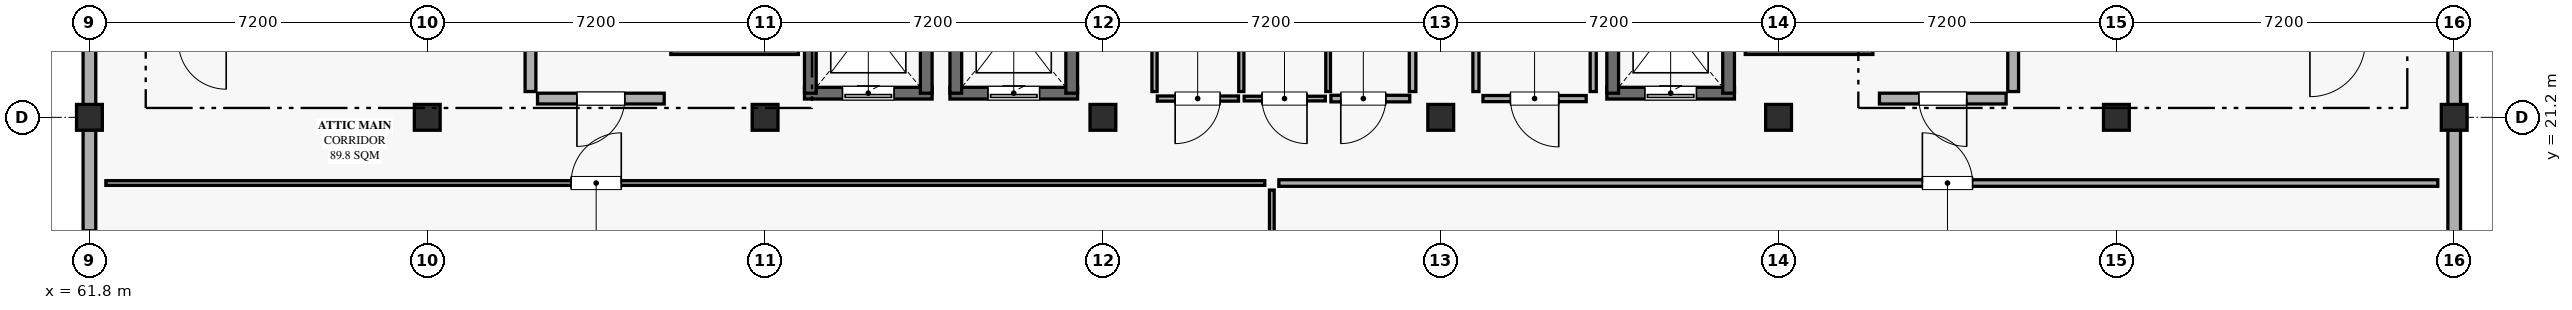
"""IFC4 building model, lengths in metres.
Left out: names, types, materials, properties, quantities, classifications, styles, units other than length and angle.
Written with IfcOpenShell. Run it as: python <this file> out.ifc"""

import sys

from ifc_helpers import new_model, si_unit, direction, frame, frame_2d, origin, origin_2d, place, context, subcontext, project, spatial, rectangle, extrude, element, fill, save


model = new_model("IFC4")
c1 = context("Model", 3, precision=1e-05, world=origin(), true_north=direction((0.0, 1.0)))
c2 = subcontext(c1, "Body", "Model", "MODEL_VIEW")
j1 = project(units=[si_unit("LENGTHUNIT", "METRE"), si_unit("PLANEANGLEUNIT", "RADIAN")], contexts=[c1])
p1 = place(None, origin())
s1 = spatial("IfcSite", under=j1, at=p1, CompositionType="ELEMENT")
p2 = place(p1, origin())
s2 = spatial("IfcBuilding", under=s1, at=p2, CompositionType="ELEMENT")
p3 = place(p2, frame((0.0, 0.0, 41.94)))
s3 = spatial("IfcBuildingStorey", under=s2, at=p3, CompositionType="ELEMENT", Elevation=41.94)
for number, where, z_axis, x_axis in (
    (1, (61.8, 21.2, 0.0), (0.0, 0.0, 1.0), (1.0, 0.0, 0.0)),
    (2, (69.0, 21.2, 0.0), (0.0, 0.0, 1.0), (1.0, 0.0, 0.0)),
    (3, (76.2, 21.2, 0.0), (0.0, 0.0, 1.0), (1.0, 0.0, 0.0)),
    (4, (83.4, 21.2, 0.0), (0.0, 0.0, 1.0), (1.0, 0.0, 0.0)),
    (5, (90.6, 21.2, 0.0), (0.0, 0.0, 1.0), (1.0, 0.0, 0.0)),
    (6, (97.8, 21.2, 0.0), (0.0, 0.0, 1.0), (1.0, 0.0, 0.0)),
    (7, (105.0, 21.2, 0.0), (0.0, 0.0, 1.0), (1.0, 0.0, 0.0)),
    (8, (112.2, 21.2, 0.0), (0.0, 0.0, 1.0), (1.0, 0.0, 0.0)),
):
    element("IfcColumn", number, at=place(p3, frame(where, z_axis=z_axis, x_axis=x_axis)), inside=s3, PredefinedType="COLUMN", context=c2, shape_type="SweptSolid", body=[
        extrude(rectangle(XDim=0.55, YDim=0.55, at=origin_2d()), origin(), (0.0, 0.0, 1.0), 4.32),
    ])
p4 = place(p3, frame((61.8, 14.26, 0.0), z_axis=(0.0, 0.0, 1.0), x_axis=(0.0, 1.0, 0.0)))
e9 = element("IfcWall", 9, at=p4, inside=s3, PredefinedType="SOLIDWALL", context=c2, shape_type="SweptSolid", body=[
    extrude(rectangle(XDim=6.68, YDim=0.27, at=frame_2d((3.34, 0.0))), origin(), (0.0, 0.0, 1.0), 2.82),
])
p5 = place(p4, frame((2.14, 0.0, 0.85)))
e10 = element("IfcOpeningElement", 10, at=p5, cuts=e9, PredefinedType="OPENING", context=c2, shape_type="SweptSolid", body=[
    extrude(rectangle(XDim=2.4, YDim=1.8, at=frame_2d((1.2, 0.9))), frame((0.0, 0.145, 0.0), z_axis=(0.0, -1.0, 0.0), x_axis=(1.0, 0.0, 0.0)), (0.0, 0.0, 1.0), 0.29),
])
p6 = place(p3, frame((112.2, 20.94, 0.0), z_axis=(0.0, 0.0, 1.0), x_axis=(0.0, -1.0, 0.0)))
e11 = element("IfcWall", 11, at=p6, inside=s3, PredefinedType="SOLIDWALL", context=c2, shape_type="SweptSolid", body=[
    extrude(rectangle(XDim=6.68, YDim=0.27, at=frame_2d((3.34, 0.0))), origin(), (0.0, 0.0, 1.0), 2.82),
])
p7 = place(p6, frame((2.59, 0.0, 0.85)))
e12 = element("IfcOpeningElement", 12, at=p7, cuts=e11, PredefinedType="OPENING", context=c2, shape_type="SweptSolid", body=[
    extrude(rectangle(XDim=1.5, YDim=1.8, at=frame_2d((0.75, 0.9))), frame((0.0, 0.145, 0.0), z_axis=(0.0, -1.0, 0.0), x_axis=(1.0, 0.0, 0.0)), (0.0, 0.0, 1.0), 0.29),
])
p8 = place(p3, frame((61.8, 21.46, 0.0), z_axis=(0.0, 0.0, 1.0), x_axis=(0.0, 1.0, 0.0)))
e13 = element("IfcWall", 13, at=p8, inside=s3, PredefinedType="SOLIDWALL", context=c2, shape_type="SweptSolid", body=[
    extrude(rectangle(XDim=6.68, YDim=0.27, at=frame_2d((3.34, 0.0))), origin(), (0.0, 0.0, 1.0), 2.82),
])
p9 = place(p8, frame((2.14, 0.0, 0.85)))
e14 = element("IfcOpeningElement", 14, at=p9, cuts=e13, PredefinedType="OPENING", context=c2, shape_type="SweptSolid", body=[
    extrude(rectangle(XDim=2.4, YDim=1.8, at=frame_2d((1.2, 0.9))), frame((0.0, 0.145, 0.0), z_axis=(0.0, -1.0, 0.0), x_axis=(1.0, 0.0, 0.0)), (0.0, 0.0, 1.0), 0.29),
])
p10 = place(p3, frame((112.2, 28.14, 0.0), z_axis=(0.0, 0.0, 1.0), x_axis=(0.0, -1.0, 0.0)))
e15 = element("IfcWall", 15, at=p10, inside=s3, PredefinedType="SOLIDWALL", context=c2, shape_type="SweptSolid", body=[
    extrude(rectangle(XDim=6.68, YDim=0.27, at=frame_2d((3.34, 0.0))), origin(), (0.0, 0.0, 1.0), 2.82),
])
p11 = place(p10, frame((2.59, 0.0, 0.85)))
e16 = element("IfcOpeningElement", 16, at=p11, cuts=e15, PredefinedType="OPENING", context=c2, shape_type="SweptSolid", body=[
    extrude(rectangle(XDim=1.5, YDim=1.8, at=frame_2d((0.75, 0.9))), frame((0.0, 0.145, 0.0), z_axis=(0.0, -1.0, 0.0), x_axis=(1.0, 0.0, 0.0)), (0.0, 0.0, 1.0), 0.29),
])
for number, where, z_axis, x_axis in (
    (17, (76.91, 22.665, 0.0), (0.0, 0.0, 1.0), (-1.0, 0.0, 0.0)),
    (18, (99.81, 22.665, 0.0), (0.0, 0.0, 1.0), (-1.0, 0.0, 0.0)),
):
    element("IfcWall", number, at=place(p3, frame(where, z_axis=z_axis, x_axis=x_axis)), inside=s3, PredefinedType="SHEAR", context=c2, shape_type="SweptSolid", body=[
        extrude(rectangle(XDim=2.72, YDim=0.25, at=frame_2d((1.36, 0.0))), origin(), (0.0, 0.0, 1.0), 4.07),
    ])
p12 = place(p3, frame((79.76, 21.715, 0.0), z_axis=(0.0, 0.0, 1.0), x_axis=(-1.0, 0.0, 0.0)))
e19 = element("IfcWall", 19, at=p12, inside=s3, PredefinedType="SHEAR", context=c2, shape_type="SweptSolid", body=[
    extrude(rectangle(XDim=2.72, YDim=0.25, at=frame_2d((1.36, 0.0))), origin(), (0.0, 0.0, 1.0), 4.07),
])
p13 = place(p12, frame((0.81, 0.0, 0.0)))
e20 = element("IfcOpeningElement", 20, at=p13, cuts=e19, PredefinedType="OPENING", context=c2, shape_type="SweptSolid", body=[
    extrude(rectangle(XDim=1.1, YDim=2.2, at=frame_2d((0.55, 1.1))), frame((0.0, 0.135, 0.0), z_axis=(0.0, -1.0, 0.0), x_axis=(1.0, 0.0, 0.0)), (0.0, 0.0, 1.0), 0.27),
])
for number, where, z_axis, x_axis in (
    (21, (77.165, 21.715, 0.0), (0.0, 0.0, 1.0), (0.0, 1.0, 0.0)),
    (22, (79.635, 24.685, 0.0), (0.0, 0.0, 1.0), (0.0, -1.0, 0.0)),
):
    element("IfcWall", number, at=place(p3, frame(where, z_axis=z_axis, x_axis=x_axis)), inside=s3, PredefinedType="SHEAR", context=c2, shape_type="SweptSolid", body=[
        extrude(rectangle(XDim=2.97, YDim=0.25, at=frame_2d((1.485, 0.0))), origin(), (0.0, 0.0, 1.0), 4.07),
    ])
p14 = place(p3, frame((82.86, 21.715, 0.0), z_axis=(0.0, 0.0, 1.0), x_axis=(-1.0, 0.0, 0.0)))
e23 = element("IfcWall", 23, at=p14, inside=s3, PredefinedType="SHEAR", context=c2, shape_type="SweptSolid", body=[
    extrude(rectangle(XDim=2.72, YDim=0.25, at=frame_2d((1.36, 0.0))), origin(), (0.0, 0.0, 1.0), 4.07),
])
p15 = place(p14, frame((0.81, 0.0, 0.0)))
e24 = element("IfcOpeningElement", 24, at=p15, cuts=e23, PredefinedType="OPENING", context=c2, shape_type="SweptSolid", body=[
    extrude(rectangle(XDim=1.1, YDim=2.2, at=frame_2d((0.55, 1.1))), frame((0.0, 0.135, 0.0), z_axis=(0.0, -1.0, 0.0), x_axis=(1.0, 0.0, 0.0)), (0.0, 0.0, 1.0), 0.27),
])
for number, where, z_axis, x_axis in (
    (25, (80.265, 21.715, 0.0), (0.0, 0.0, 1.0), (0.0, 1.0, 0.0)),
    (26, (82.735, 24.685, 0.0), (0.0, 0.0, 1.0), (0.0, -1.0, 0.0)),
):
    element("IfcWall", number, at=place(p3, frame(where, z_axis=z_axis, x_axis=x_axis)), inside=s3, PredefinedType="SHEAR", context=c2, shape_type="SweptSolid", body=[
        extrude(rectangle(XDim=2.97, YDim=0.25, at=frame_2d((1.485, 0.0))), origin(), (0.0, 0.0, 1.0), 4.07),
    ])
p16 = place(p3, frame((96.86, 21.715, 0.0), z_axis=(0.0, 0.0, 1.0), x_axis=(-1.0, 0.0, 0.0)))
e27 = element("IfcWall", 27, at=p16, inside=s3, PredefinedType="SHEAR", context=c2, shape_type="SweptSolid", body=[
    extrude(rectangle(XDim=2.72, YDim=0.25, at=frame_2d((1.36, 0.0))), origin(), (0.0, 0.0, 1.0), 4.07),
])
p17 = place(p16, frame((0.81, 0.0, 0.0)))
e28 = element("IfcOpeningElement", 28, at=p17, cuts=e27, PredefinedType="OPENING", context=c2, shape_type="SweptSolid", body=[
    extrude(rectangle(XDim=1.1, YDim=2.2, at=frame_2d((0.55, 1.1))), frame((0.0, 0.135, 0.0), z_axis=(0.0, -1.0, 0.0), x_axis=(1.0, 0.0, 0.0)), (0.0, 0.0, 1.0), 0.27),
])
for number, where, z_axis, x_axis in (
    (29, (94.265, 21.715, 0.0), (0.0, 0.0, 1.0), (0.0, 1.0, 0.0)),
    (30, (96.735, 24.685, 0.0), (0.0, 0.0, 1.0), (0.0, -1.0, 0.0)),
):
    element("IfcWall", number, at=place(p3, frame(where, z_axis=z_axis, x_axis=x_axis)), inside=s3, PredefinedType="SHEAR", context=c2, shape_type="SweptSolid", body=[
        extrude(rectangle(XDim=2.97, YDim=0.25, at=frame_2d((1.485, 0.0))), origin(), (0.0, 0.0, 1.0), 4.07),
    ])
p18 = place(p3, frame((74.05, 21.6, 0.0), z_axis=(0.0, 0.0, 1.0), x_axis=(-1.0, 0.0, 0.0)))
e31 = element("IfcWall", 31, at=p18, inside=s3, PredefinedType="PARTITIONING", context=c2, shape_type="SweptSolid", body=[
    extrude(rectangle(XDim=2.7, YDim=0.23, at=frame_2d((1.35, 0.0))), origin(), (0.0, 0.0, 1.0), 2.8),
])
p19 = place(p18, frame((0.84, 0.0, 0.0)))
e32 = element("IfcOpeningElement", 32, at=p19, cuts=e31, PredefinedType="OPENING", context=c2, shape_type="SweptSolid", body=[
    extrude(rectangle(XDim=1.02, YDim=2.06, at=frame_2d((0.51, 1.03))), frame((0.0, 0.125, 0.0), z_axis=(0.0, -1.0, 0.0), x_axis=(1.0, 0.0, 0.0)), (0.0, 0.0, 1.0), 0.25),
])
p20 = place(p3, frame((71.2, 21.75, 0.0), z_axis=(0.0, 0.0, 1.0), x_axis=(0.0, 1.0, 0.0)))
e33 = element("IfcWall", 33, at=p20, inside=s3, PredefinedType="PARTITIONING", context=c2, shape_type="SweptSolid", body=[
    extrude(rectangle(XDim=4.9, YDim=0.23, at=frame_2d((2.45, 0.0))), origin(), (0.0, 0.0, 1.0), 2.8),
])
p21 = place(p3, frame((102.65, 21.6, 0.0), z_axis=(0.0, 0.0, 1.0), x_axis=(-1.0, 0.0, 0.0)))
e34 = element("IfcWall", 34, at=p21, inside=s3, PredefinedType="PARTITIONING", context=c2, shape_type="SweptSolid", body=[
    extrude(rectangle(XDim=2.7, YDim=0.23, at=frame_2d((1.35, 0.0))), origin(), (0.0, 0.0, 1.0), 2.8),
])
p22 = place(p21, frame((0.84, 0.0, 0.0)))
e35 = element("IfcOpeningElement", 35, at=p22, cuts=e34, PredefinedType="OPENING", context=c2, shape_type="SweptSolid", body=[
    extrude(rectangle(XDim=1.02, YDim=2.12, at=frame_2d((0.51, 1.06))), frame((0.0, 0.125, 0.0), z_axis=(0.0, -1.0, 0.0), x_axis=(1.0, 0.0, 0.0)), (0.0, 0.0, 1.0), 0.25),
])
p23 = place(p3, frame((102.8, 26.65, 0.0), z_axis=(0.0, 0.0, 1.0), x_axis=(0.0, -1.0, 0.0)))
e36 = element("IfcWall", 36, at=p23, inside=s3, PredefinedType="PARTITIONING", context=c2, shape_type="SweptSolid", body=[
    extrude(rectangle(XDim=4.9, YDim=0.23, at=frame_2d((2.45, 0.0))), origin(), (0.0, 0.0, 1.0), 2.8),
])
p24 = place(p3, frame((86.29, 21.6, 0.0), z_axis=(0.0, 0.0, 1.0), x_axis=(-1.0, 0.0, 0.0)))
e37 = element("IfcWall", 37, at=p24, inside=s3, PredefinedType="PARTITIONING", context=c2, shape_type="SweptSolid", body=[
    extrude(rectangle(XDim=1.73, YDim=0.11, at=frame_2d((0.865, 0.0))), origin(), (0.0, 0.0, 1.0), 2.8),
])
p25 = place(p24, frame((0.39, 0.0, 0.0)))
e38 = element("IfcOpeningElement", 38, at=p25, cuts=e37, PredefinedType="OPENING", context=c2, shape_type="SweptSolid", body=[
    extrude(rectangle(XDim=0.96, YDim=2.05, at=frame_2d((0.48, 1.025))), frame((0.0, 0.065, 0.0), z_axis=(0.0, -1.0, 0.0), x_axis=(1.0, 0.0, 0.0)), (0.0, 0.0, 1.0), 0.13),
])
for number, where, z_axis, x_axis in (
    (39, (84.5, 21.75, 0.0), (0.0, 0.0, 1.0), (0.0, 1.0, 0.0)),
    (40, (86.35, 25.05, 0.0), (0.0, 0.0, 1.0), (0.0, -1.0, 0.0)),
):
    element("IfcWall", number, at=place(p3, frame(where, z_axis=z_axis, x_axis=x_axis)), inside=s3, PredefinedType="PARTITIONING", context=c2, shape_type="SweptSolid", body=[
        extrude(rectangle(XDim=3.3, YDim=0.11, at=frame_2d((1.65, 0.0))), origin(), (0.0, 0.0, 1.0), 2.8),
    ])
p26 = place(p3, frame((88.14, 21.6, 0.0), z_axis=(0.0, 0.0, 1.0), x_axis=(-1.0, 0.0, 0.0)))
e41 = element("IfcWall", 41, at=p26, inside=s3, PredefinedType="PARTITIONING", context=c2, shape_type="SweptSolid", body=[
    extrude(rectangle(XDim=1.73, YDim=0.1, at=frame_2d((0.865, 0.0))), origin(), (0.0, 0.0, 1.0), 2.8),
])
p27 = place(p26, frame((0.39, 0.0, 0.0)))
e42 = element("IfcOpeningElement", 42, at=p27, cuts=e41, PredefinedType="OPENING", context=c2, shape_type="SweptSolid", body=[
    extrude(rectangle(XDim=0.96, YDim=2.1, at=frame_2d((0.48, 1.05))), frame((0.0, 0.06, 0.0), z_axis=(0.0, -1.0, 0.0), x_axis=(1.0, 0.0, 0.0)), (0.0, 0.0, 1.0), 0.12),
])
p28 = place(p3, frame((88.2, 25.05, 0.0), z_axis=(0.0, 0.0, 1.0), x_axis=(0.0, -1.0, 0.0)))
e43 = element("IfcWall", 43, at=p28, inside=s3, PredefinedType="PARTITIONING", context=c2, shape_type="SweptSolid", body=[
    extrude(rectangle(XDim=3.3, YDim=0.1, at=frame_2d((1.65, 0.0))), origin(), (0.0, 0.0, 1.0), 2.8),
])
p29 = place(p3, frame((89.94, 21.6, 0.0), z_axis=(0.0, 0.0, 1.0), x_axis=(-1.0, 0.0, 0.0)))
e44 = element("IfcWall", 44, at=p29, inside=s3, PredefinedType="PARTITIONING", context=c2, shape_type="SweptSolid", body=[
    extrude(rectangle(XDim=1.68, YDim=0.14, at=frame_2d((0.84, 0.0))), origin(), (0.0, 0.0, 1.0), 2.8),
])
p30 = place(p29, frame((0.51, 0.0, 0.0)))
e45 = element("IfcOpeningElement", 45, at=p30, cuts=e44, PredefinedType="OPENING", context=c2, shape_type="SweptSolid", body=[
    extrude(rectangle(XDim=0.96, YDim=2.16, at=frame_2d((0.48, 1.08))), frame((0.0, 0.08, 0.0), z_axis=(0.0, -1.0, 0.0), x_axis=(1.0, 0.0, 0.0)), (0.0, 0.0, 1.0), 0.16),
])
p31 = place(p3, frame((90.0, 25.05, 0.0), z_axis=(0.0, 0.0, 1.0), x_axis=(0.0, -1.0, 0.0)))
e46 = element("IfcWall", 46, at=p31, inside=s3, PredefinedType="PARTITIONING", context=c2, shape_type="SweptSolid", body=[
    extrude(rectangle(XDim=3.3, YDim=0.14, at=frame_2d((1.65, 0.0))), origin(), (0.0, 0.0, 1.0), 2.8),
])
p32 = place(p3, frame((93.7, 21.6, 0.0), z_axis=(0.0, 0.0, 1.0), x_axis=(-1.0, 0.0, 0.0)))
e47 = element("IfcWall", 47, at=p32, inside=s3, PredefinedType="PARTITIONING", context=c2, shape_type="SweptSolid", body=[
    extrude(rectangle(XDim=2.2, YDim=0.13, at=frame_2d((1.1, 0.0))), origin(), (0.0, 0.0, 1.0), 2.8),
])
p33 = place(p32, frame((0.585, 0.0, 0.0)))
e48 = element("IfcOpeningElement", 48, at=p33, cuts=e47, PredefinedType="OPENING", context=c2, shape_type="SweptSolid", body=[
    extrude(rectangle(XDim=1.03, YDim=2.22, at=frame_2d((0.515, 1.11))), frame((0.0, 0.075, 0.0), z_axis=(0.0, -1.0, 0.0), x_axis=(1.0, 0.0, 0.0)), (0.0, 0.0, 1.0), 0.15),
])
for number, where, z_axis, x_axis in (
    (49, (91.35, 21.75, 0.0), (0.0, 0.0, 1.0), (0.0, 1.0, 0.0)),
    (50, (93.85, 25.05, 0.0), (0.0, 0.0, 1.0), (0.0, -1.0, 0.0)),
):
    element("IfcWall", number, at=place(p3, frame(where, z_axis=z_axis, x_axis=x_axis)), inside=s3, PredefinedType="PARTITIONING", context=c2, shape_type="SweptSolid", body=[
        extrude(rectangle(XDim=3.3, YDim=0.13, at=frame_2d((1.65, 0.0))), origin(), (0.0, 0.0, 1.0), 2.8),
    ])
p34 = place(p3, frame((62.15, 19.8, 0.0), z_axis=(0.0, 0.0, 1.0), x_axis=(1.0, 0.0, 0.0)))
e51 = element("IfcWall", 51, at=p34, inside=s3, PredefinedType="PARTITIONING", context=c2, shape_type="SweptSolid", body=[
    extrude(rectangle(XDim=24.7, YDim=0.1, at=frame_2d((12.35, 0.0))), origin(), (0.0, 0.0, 1.0), 2.8),
])
p35 = place(p34, frame((9.915, 0.0, 0.0)))
e52 = element("IfcOpeningElement", 52, at=p35, cuts=e51, PredefinedType="OPENING", context=c2, shape_type="SweptSolid", body=[
    extrude(rectangle(XDim=1.07, YDim=2.05, at=frame_2d((0.535, 1.025))), frame((0.0, 0.06, 0.0), z_axis=(0.0, -1.0, 0.0), x_axis=(1.0, 0.0, 0.0)), (0.0, 0.0, 1.0), 0.12),
])
p36 = place(p3, frame((87.0, 19.65, 0.0), z_axis=(0.0, 0.0, 1.0), x_axis=(0.0, -1.0, 0.0)))
e53 = element("IfcWall", 53, at=p36, inside=s3, PredefinedType="PARTITIONING", context=c2, shape_type="SweptSolid", body=[
    extrude(rectangle(XDim=5.35, YDim=0.1, at=frame_2d((2.675, 0.0))), origin(), (0.0, 0.0, 1.0), 2.8),
])
p37 = place(p3, frame((87.15, 19.8, 0.0), z_axis=(0.0, 0.0, 1.0), x_axis=(1.0, 0.0, 0.0)))
e54 = element("IfcWall", 54, at=p37, inside=s3, PredefinedType="PARTITIONING", context=c2, shape_type="SweptSolid", body=[
    extrude(rectangle(XDim=24.7, YDim=0.14, at=frame_2d((12.35, 0.0))), origin(), (0.0, 0.0, 1.0), 2.8),
])
p38 = place(p37, frame((13.715, 0.0, 0.0)))
e55 = element("IfcOpeningElement", 55, at=p38, cuts=e54, PredefinedType="OPENING", context=c2, shape_type="SweptSolid", body=[
    extrude(rectangle(XDim=1.07, YDim=2.1, at=frame_2d((0.535, 1.05))), frame((0.0, 0.08, 0.0), z_axis=(0.0, -1.0, 0.0), x_axis=(1.0, 0.0, 0.0)), (0.0, 0.0, 1.0), 0.16),
])
p39 = place(p13, origin())
e56 = element("IfcDoor", 56, at=p39, inside=s3, OperationType="SLIDING_TO_LEFT", PredefinedType="DOOR", context=c2, shape_type="SweptSolid", body=[
    extrude(rectangle(XDim=1.1, YDim=2.2, at=frame_2d((0.55, 1.1))), frame((0.0, 0.025, 0.0), z_axis=(0.0, -1.0, 0.0), x_axis=(1.0, 0.0, 0.0)), (0.0, 0.0, 1.0), 0.05),
])
fill(e20, e56)
p40 = place(p15, origin())
e57 = element("IfcDoor", 57, at=p40, inside=s3, OperationType="SLIDING_TO_LEFT", PredefinedType="DOOR", context=c2, shape_type="SweptSolid", body=[
    extrude(rectangle(XDim=1.1, YDim=2.2, at=frame_2d((0.55, 1.1))), frame((0.0, 0.025, 0.0), z_axis=(0.0, -1.0, 0.0), x_axis=(1.0, 0.0, 0.0)), (0.0, 0.0, 1.0), 0.05),
])
fill(e24, e57)
p41 = place(p17, origin())
e58 = element("IfcDoor", 58, at=p41, inside=s3, OperationType="SLIDING_TO_LEFT", PredefinedType="DOOR", context=c2, shape_type="SweptSolid", body=[
    extrude(rectangle(XDim=1.1, YDim=2.2, at=frame_2d((0.55, 1.1))), frame((0.0, 0.025, 0.0), z_axis=(0.0, -1.0, 0.0), x_axis=(1.0, 0.0, 0.0)), (0.0, 0.0, 1.0), 0.05),
])
fill(e28, e58)
p42 = place(p19, origin())
e59 = element("IfcDoor", 59, at=p42, inside=s3, OperationType="SINGLE_SWING_RIGHT", PredefinedType="DOOR", context=c2, shape_type="SweptSolid", body=[
    extrude(rectangle(XDim=1.02, YDim=2.06, at=frame_2d((0.51, 1.03))), frame((0.0, 0.025, 0.0), z_axis=(0.0, -1.0, 0.0), x_axis=(1.0, 0.0, 0.0)), (0.0, 0.0, 1.0), 0.05),
])
fill(e32, e59)
p43 = place(p22, origin())
e60 = element("IfcDoor", 60, at=p43, inside=s3, OperationType="SINGLE_SWING_LEFT", PredefinedType="DOOR", context=c2, shape_type="SweptSolid", body=[
    extrude(rectangle(XDim=1.02, YDim=2.12, at=frame_2d((0.51, 1.06))), frame((0.0, 0.025, 0.0), z_axis=(0.0, -1.0, 0.0), x_axis=(1.0, 0.0, 0.0)), (0.0, 0.0, 1.0), 0.05),
])
fill(e35, e60)
p44 = place(p25, origin())
e61 = element("IfcDoor", 61, at=p44, inside=s3, OperationType="SINGLE_SWING_RIGHT", PredefinedType="DOOR", context=c2, shape_type="SweptSolid", body=[
    extrude(rectangle(XDim=0.96, YDim=2.05, at=frame_2d((0.48, 1.025))), frame((0.0, 0.025, 0.0), z_axis=(0.0, -1.0, 0.0), x_axis=(1.0, 0.0, 0.0)), (0.0, 0.0, 1.0), 0.05),
])
fill(e38, e61)
p45 = place(p27, origin())
e62 = element("IfcDoor", 62, at=p45, inside=s3, OperationType="SINGLE_SWING_LEFT", PredefinedType="DOOR", context=c2, shape_type="SweptSolid", body=[
    extrude(rectangle(XDim=0.96, YDim=2.1, at=frame_2d((0.48, 1.05))), frame((0.0, 0.025, 0.0), z_axis=(0.0, -1.0, 0.0), x_axis=(1.0, 0.0, 0.0)), (0.0, 0.0, 1.0), 0.05),
])
fill(e42, e62)
p46 = place(p30, origin())
e63 = element("IfcDoor", 63, at=p46, inside=s3, OperationType="SINGLE_SWING_RIGHT", PredefinedType="DOOR", context=c2, shape_type="SweptSolid", body=[
    extrude(rectangle(XDim=0.96, YDim=2.16, at=frame_2d((0.48, 1.08))), frame((0.0, 0.025, 0.0), z_axis=(0.0, -1.0, 0.0), x_axis=(1.0, 0.0, 0.0)), (0.0, 0.0, 1.0), 0.05),
])
fill(e45, e63)
p47 = place(p33, origin())
e64 = element("IfcDoor", 64, at=p47, inside=s3, OperationType="SINGLE_SWING_LEFT", PredefinedType="DOOR", context=c2, shape_type="SweptSolid", body=[
    extrude(rectangle(XDim=1.03, YDim=2.22, at=frame_2d((0.515, 1.11))), frame((0.0, 0.025, 0.0), z_axis=(0.0, -1.0, 0.0), x_axis=(1.0, 0.0, 0.0)), (0.0, 0.0, 1.0), 0.05),
])
fill(e48, e64)
p48 = place(p35, origin())
e65 = element("IfcDoor", 65, at=p48, inside=s3, OperationType="SINGLE_SWING_RIGHT", PredefinedType="DOOR", context=c2, shape_type="SweptSolid", body=[
    extrude(rectangle(XDim=1.07, YDim=2.05, at=frame_2d((0.535, 1.025))), frame((0.0, 0.025, 0.0), z_axis=(0.0, -1.0, 0.0), x_axis=(1.0, 0.0, 0.0)), (0.0, 0.0, 1.0), 0.05),
])
fill(e52, e65)
p49 = place(p38, origin())
e66 = element("IfcDoor", 66, at=p49, inside=s3, OperationType="SINGLE_SWING_LEFT", PredefinedType="DOOR", context=c2, shape_type="SweptSolid", body=[
    extrude(rectangle(XDim=1.07, YDim=2.1, at=frame_2d((0.535, 1.05))), frame((0.0, 0.025, 0.0), z_axis=(0.0, -1.0, 0.0), x_axis=(1.0, 0.0, 0.0)), (0.0, 0.0, 1.0), 0.05),
])
fill(e55, e66)
save(model, sys.argv[1])
